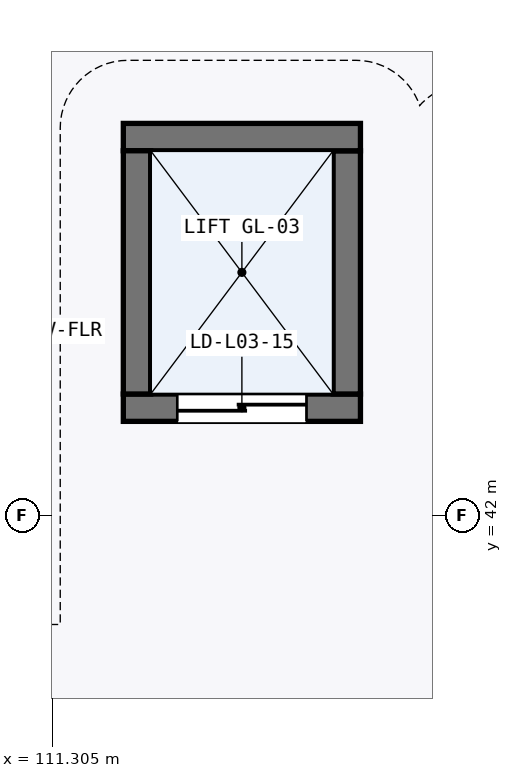
"""IFC4 building model, lengths in metres.
Left out: names, types, materials, properties, quantities, classifications, styles, units other than length and angle.
Written with IfcOpenShell. Run it as: python <this file> out.ifc"""

import sys

from ifc_helpers import new_model, si_unit, direction, frame, frame_2d, origin, place, context, subcontext, project, spatial, rectangle, extrude, element, fill, save


model = new_model("IFC4")
c1 = context("Model", 3, precision=1e-05, world=origin(), true_north=direction((0.0, 1.0)))
c2 = subcontext(c1, "Body", "Model", "MODEL_VIEW")
j1 = project(units=[si_unit("LENGTHUNIT", "METRE"), si_unit("PLANEANGLEUNIT", "RADIAN")], contexts=[c1])
p1 = place(None, origin())
s1 = spatial("IfcSite", under=j1, at=p1, CompositionType="ELEMENT")
p2 = place(p1, origin())
s2 = spatial("IfcBuilding", under=s1, at=p2, CompositionType="ELEMENT")
p3 = place(p2, frame((0.0, 0.0, 11.4)))
s3 = spatial("IfcBuildingStorey", under=s2, at=p3, CompositionType="ELEMENT", Elevation=11.4)
p4 = place(p3, frame((112.24, 43.42, 0.0), z_axis=(0.0, 0.0, 1.0), x_axis=(1.0, 0.0, 0.0)))
e1 = element("IfcWall", 1, at=p4, inside=s3, PredefinedType="SHEAR", context=c2, shape_type="SweptSolid", body=[
    extrude(rectangle(XDim=3.12, YDim=0.36, at=frame_2d((1.56, 0.0))), origin(), (0.0, 0.0, 1.0), 4.095),
])
p5 = place(p4, frame((0.71, 0.0, 0.0)))
e2 = element("IfcOpeningElement", 2, at=p5, cuts=e1, PredefinedType="OPENING", context=c2, shape_type="SweptSolid", body=[
    extrude(rectangle(XDim=1.7, YDim=2.3, at=frame_2d((0.85, 1.15))), frame((0.0, 0.19, 0.0), z_axis=(0.0, -1.0, 0.0), x_axis=(1.0, 0.0, 0.0)), (0.0, 0.0, 1.0), 0.38),
])
p6 = place(p3, frame((115.18, 43.6, 0.0), z_axis=(0.0, 0.0, 1.0), x_axis=(0.0, 1.0, 0.0)))
e3 = element("IfcWall", 3, at=p6, inside=s3, PredefinedType="SHEAR", context=c2, shape_type="SweptSolid", body=[
    extrude(rectangle(XDim=3.2, YDim=0.36, at=frame_2d((1.6, 0.0))), origin(), (0.0, 0.0, 1.0), 4.095),
])
p7 = place(p3, frame((115.36, 46.98, 0.0), z_axis=(0.0, 0.0, 1.0), x_axis=(-1.0, 0.0, 0.0)))
e4 = element("IfcWall", 4, at=p7, inside=s3, PredefinedType="SHEAR", context=c2, shape_type="SweptSolid", body=[
    extrude(rectangle(XDim=3.12, YDim=0.36, at=frame_2d((1.56, 0.0))), origin(), (0.0, 0.0, 1.0), 4.095),
])
p8 = place(p3, frame((112.42, 46.8, 0.0), z_axis=(0.0, 0.0, 1.0), x_axis=(0.0, -1.0, 0.0)))
e5 = element("IfcWall", 5, at=p8, inside=s3, PredefinedType="SHEAR", context=c2, shape_type="SweptSolid", body=[
    extrude(rectangle(XDim=3.2, YDim=0.36, at=frame_2d((1.6, 0.0))), origin(), (0.0, 0.0, 1.0), 4.095),
])
p9 = place(p5, frame((1.7, 0.0, 0.0), z_axis=(0.0, 0.0, 1.0), x_axis=(-1.0, 0.0, 0.0)))
e6 = element("IfcDoor", 6, at=p9, inside=s3, OperationType="DOUBLE_DOOR_SLIDING", PredefinedType="DOOR", context=c2, shape_type="SweptSolid", body=[
    extrude(rectangle(XDim=1.7, YDim=2.3, at=frame_2d((0.85, 1.15))), frame((0.0, 0.025, 0.0), z_axis=(0.0, -1.0, 0.0), x_axis=(1.0, 0.0, 0.0)), (0.0, 0.0, 1.0), 0.05),
])
fill(e2, e6)
save(model, sys.argv[1])
